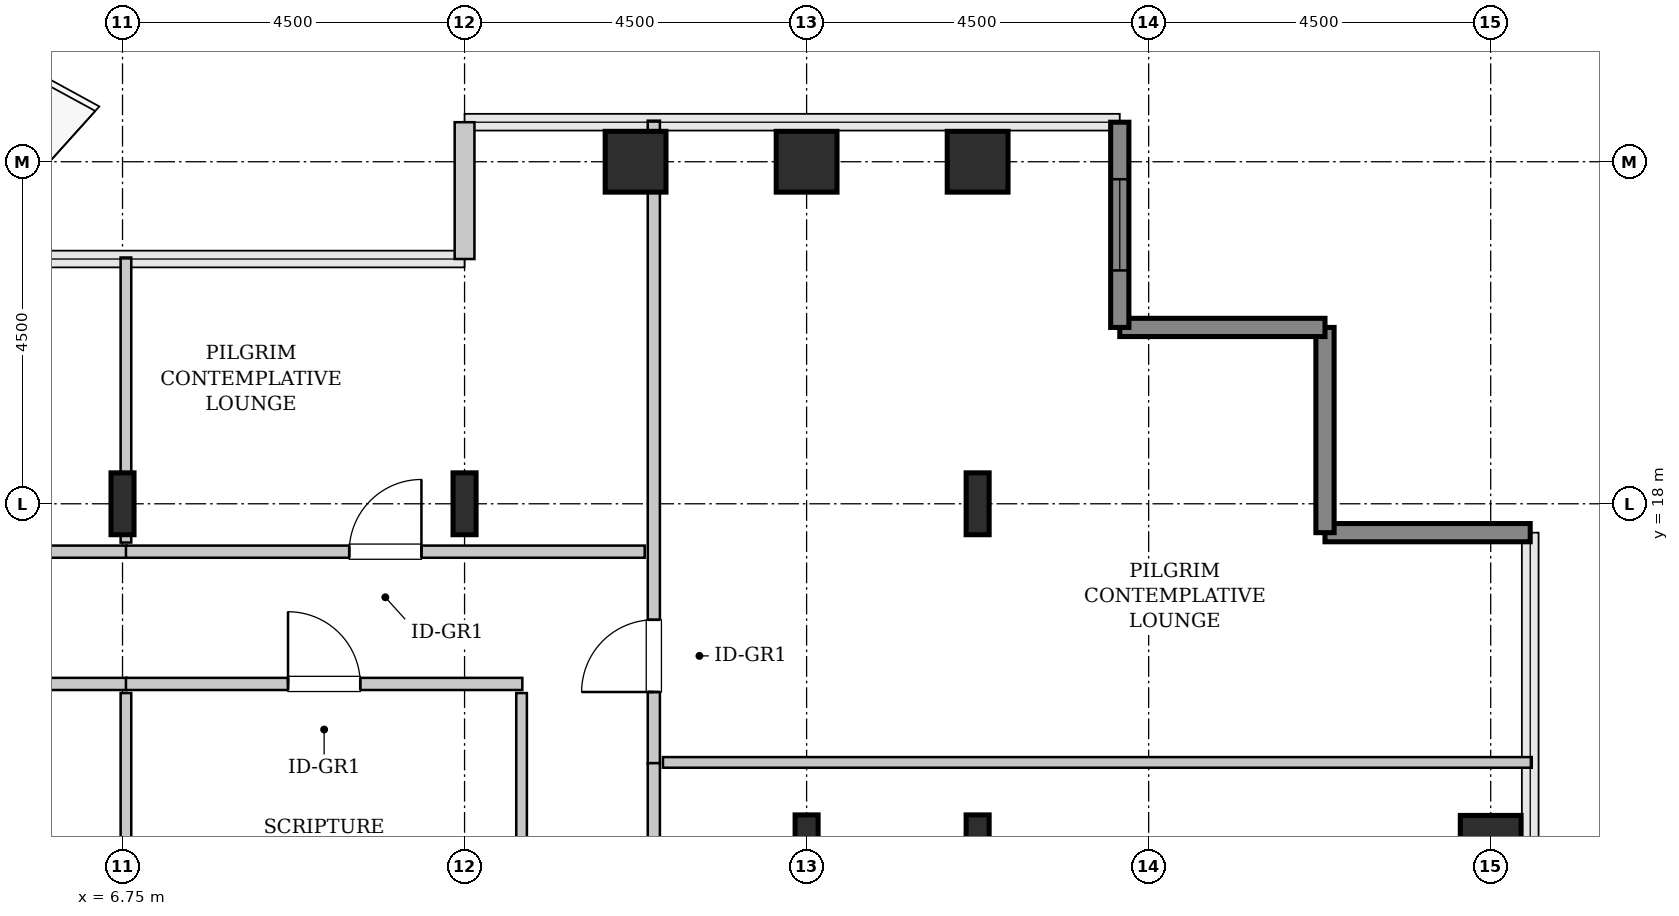
"""IFC4 building model, lengths in metres.
Left out: names, types, materials, properties, quantities, classifications, styles, units other than length and angle.
Written with IfcOpenShell. Run it as: python <this file> out.ifc"""

import sys

from ifc_helpers import new_model, si_unit, direction, frame, frame_2d, origin, origin_2d, place, context, subcontext, project, spatial, rectangle, hollow_rectangle, i_section, extrude, source, transform, mapped, element, fill, save


model = new_model("IFC4")
c1 = context("Model", 3, precision=1e-05, world=origin(), true_north=direction((0.0, 1.0)))
c2 = subcontext(c1, "Body", "Model", "MODEL_VIEW")
j1 = project(units=[si_unit("LENGTHUNIT", "METRE"), si_unit("PLANEANGLEUNIT", "RADIAN")], contexts=[c1])
p1 = place(None, origin())
s1 = spatial("IfcSite", under=j1, at=p1, CompositionType="ELEMENT")
p2 = place(p1, origin())
s2 = spatial("IfcBuilding", under=s1, at=p2, CompositionType="ELEMENT")
p3 = place(p2, frame((0.0, 0.0, 164.0)))
s3 = spatial("IfcBuildingStorey", under=s2, at=p3, CompositionType="ELEMENT", Elevation=164.0)
m1 = source(origin(), c2, "Body", "SweptSolid", [
    extrude(i_section(OverallWidth=0.303, OverallDepth=0.814, WebThickness=0.021, FlangeThickness=0.04, FilletRadius=0.03, at=origin_2d()), origin(), (0.0, 0.0, 1.0), 3.8),
])
for number, where, z_axis, x_axis in (
    (1, (6.75, 18.0, 0.0), (0.0, 0.0, 1.0), (1.0, 0.0, 0.0)),
    (2, (11.25, 18.0, 0.0), (0.0, 0.0, 1.0), (1.0, 0.0, 0.0)),
):
    element("IfcColumn", number, at=place(p3, frame(where, z_axis=z_axis, x_axis=x_axis)), inside=s3, PredefinedType="COLUMN", context=c2, shape_type="MappedRepresentation", body=[
        mapped(m1, transform((0.0, 0.0, 0.0), x_axis=(1.0, 0.0, 0.0), y_axis=(0.0, 1.0, 0.0), z_axis=(0.0, 0.0, 1.0), scale=1.0)),
    ])
m2 = source(origin(), c2, "Body", "SweptSolid", [
    extrude(hollow_rectangle(XDim=0.8, YDim=0.8, WallThickness=0.04, InnerFilletRadius=0.04, OuterFilletRadius=0.08, at=origin_2d()), origin(), (0.0, 0.0, 1.0), 3.8),
])
p4 = place(p3, frame((13.5, 22.5, 0.0), z_axis=(0.0, 0.0, 1.0), x_axis=(1.0, 0.0, 0.0)))
e3 = element("IfcColumn", 3, at=p4, inside=s3, PredefinedType="COLUMN", context=c2, shape_type="MappedRepresentation", body=[
    mapped(m2, transform((0.0, 0.0, 0.0), x_axis=(1.0, 0.0, 0.0), y_axis=(0.0, 1.0, 0.0), z_axis=(0.0, 0.0, 1.0), scale=1.0)),
])
p5 = place(p3, frame((15.75, 13.5, 0.0), z_axis=(0.0, 0.0, 1.0), x_axis=(1.0, 0.0, 0.0)))
e4 = element("IfcColumn", 4, at=p5, inside=s3, PredefinedType="COLUMN", context=c2, shape_type="MappedRepresentation", body=[
    mapped(m1, transform((0.0, 0.0, 0.0), x_axis=(1.0, 0.0, 0.0), y_axis=(0.0, 1.0, 0.0), z_axis=(0.0, 0.0, 1.0), scale=1.0)),
])
p6 = place(p3, frame((15.75, 22.5, 0.0), z_axis=(0.0, 0.0, 1.0), x_axis=(1.0, 0.0, 0.0)))
e5 = element("IfcColumn", 5, at=p6, inside=s3, PredefinedType="COLUMN", context=c2, shape_type="MappedRepresentation", body=[
    mapped(m2, transform((0.0, 0.0, 0.0), x_axis=(1.0, 0.0, 0.0), y_axis=(0.0, 1.0, 0.0), z_axis=(0.0, 0.0, 1.0), scale=1.0)),
])
for number, where, z_axis, x_axis in (
    (6, (18.0, 13.5, 0.0), (0.0, 0.0, 1.0), (1.0, 0.0, 0.0)),
    (7, (18.0, 18.0, 0.0), (0.0, 0.0, 1.0), (1.0, 0.0, 0.0)),
):
    element("IfcColumn", number, at=place(p3, frame(where, z_axis=z_axis, x_axis=x_axis)), inside=s3, PredefinedType="COLUMN", context=c2, shape_type="MappedRepresentation", body=[
        mapped(m1, transform((0.0, 0.0, 0.0), x_axis=(1.0, 0.0, 0.0), y_axis=(0.0, 1.0, 0.0), z_axis=(0.0, 0.0, 1.0), scale=1.0)),
    ])
for number, where, z_axis, x_axis in (
    (8, (18.0, 22.5, 0.0), (0.0, 0.0, 1.0), (1.0, 0.0, 0.0)),
    (9, (24.75, 13.5, 0.0), (0.0, 0.0, 1.0), (1.0, 0.0, 0.0)),
):
    element("IfcColumn", number, at=place(p3, frame(where, z_axis=z_axis, x_axis=x_axis)), inside=s3, PredefinedType="COLUMN", context=c2, shape_type="MappedRepresentation", body=[
        mapped(m2, transform((0.0, 0.0, 0.0), x_axis=(1.0, 0.0, 0.0), y_axis=(0.0, 1.0, 0.0), z_axis=(0.0, 0.0, 1.0), scale=1.0)),
    ])
m3 = source(origin(), c2, "Body", "SweptSolid", [
    extrude(rectangle(XDim=2.7, YDim=0.24, at=frame_2d((1.35, 0.0))), origin(), (0.0, 0.0, 1.0), 3.55),
])
for number, where, z_axis, x_axis in (
    (10, (25.27, 17.62, 0.0), (0.0, 0.0, 1.0), (-1.0, 0.0, 0.0)),
    (11, (22.57, 17.62, 0.0), (0.0, 0.0, 1.0), (0.0, 1.0, 0.0)),
    (12, (22.57, 20.32, 0.0), (0.0, 0.0, 1.0), (-1.0, 0.0, 0.0)),
):
    element("IfcWall", number, at=place(p3, frame(where, z_axis=z_axis, x_axis=x_axis)), inside=s3, PredefinedType="SHEAR", context=c2, shape_type="MappedRepresentation", body=[
        mapped(m3, transform((0.0, 0.0, 0.0), x_axis=(1.0, 0.0, 0.0), y_axis=(0.0, 1.0, 0.0), z_axis=(0.0, 0.0, 1.0), scale=1.0)),
    ])
p7 = place(p3, frame((19.87, 20.32, 0.0), z_axis=(0.0, 0.0, 1.0), x_axis=(0.0, 1.0, 0.0)))
e13 = element("IfcWall", 13, at=p7, inside=s3, PredefinedType="SHEAR", context=c2, shape_type="MappedRepresentation", body=[
    mapped(m3, transform((0.0, 0.0, 0.0), x_axis=(1.0, 0.0, 0.0), y_axis=(0.0, 1.0, 0.0), z_axis=(0.0, 0.0, 1.0), scale=1.0)),
])
p8 = place(p7, frame((0.75, 0.0, 0.85)))
e14 = element("IfcOpeningElement", 14, at=p8, cuts=e13, PredefinedType="OPENING", context=c2, shape_type="SweptSolid", body=[
    extrude(rectangle(XDim=1.2, YDim=1.8, at=frame_2d((0.6, 0.9))), frame((0.0, 0.13, 0.0), z_axis=(0.0, -1.0, 0.0), x_axis=(1.0, 0.0, 0.0)), (0.0, 0.0, 1.0), 0.26),
])
m4 = source(origin(), c2, "Body", "SweptSolid", [
    extrude(rectangle(XDim=1.8, YDim=0.26, at=frame_2d((0.9, 0.0))), origin(), (0.0, 0.0, 1.0), 3.55),
])
p9 = place(p3, frame((11.25, 23.02, 0.0), z_axis=(0.0, 0.0, 1.0), x_axis=(0.0, -1.0, 0.0)))
e15 = element("IfcWall", 15, at=p9, inside=s3, PredefinedType="SOLIDWALL", context=c2, shape_type="MappedRepresentation", body=[
    mapped(m4, transform((0.0, 0.0, 0.0), x_axis=(1.0, 0.0, 0.0), y_axis=(0.0, 1.0, 0.0), z_axis=(0.0, 0.0, 1.0), scale=1.0)),
])
m5 = source(origin(), c2, "Body", "SweptSolid", [
    extrude(rectangle(XDim=8.453, YDim=0.16, at=frame_2d((4.226, 0.0))), origin(), (0.0, 0.0, 1.0), 3.535),
])
p10 = place(p3, frame((13.74, 14.587, 0.0), z_axis=(0.0, 0.0, 1.0), x_axis=(0.0, 1.0, 0.0)))
e16 = element("IfcWall", 16, at=p10, inside=s3, PredefinedType="PARTITIONING", context=c2, shape_type="MappedRepresentation", body=[
    mapped(m5, transform((0.0, 0.0, 0.0), x_axis=(1.0, 0.0, 0.0), y_axis=(0.0, 1.0, 0.0), z_axis=(0.0, 0.0, 1.0), scale=1.0)),
])
p11 = place(p10, frame((0.936, 0.0, 0.0)))
e17 = element("IfcOpeningElement", 17, at=p11, cuts=e16, PredefinedType="OPENING", context=c2, shape_type="SweptSolid", body=[
    extrude(rectangle(XDim=0.95, YDim=2.1, at=frame_2d((0.475, 1.05))), frame((0.0, 0.09, 0.0), z_axis=(0.0, -1.0, 0.0), x_axis=(1.0, 0.0, 0.0)), (0.0, 0.0, 1.0), 0.18),
])
m6 = source(origin(), c2, "Body", "SweptSolid", [
    extrude(rectangle(XDim=11.43, YDim=0.14, at=frame_2d((5.715, 0.0))), origin(), (0.0, 0.0, 1.0), 3.535),
])
p12 = place(p3, frame((13.86, 14.597, 0.0), z_axis=(0.0, 0.0, 1.0), x_axis=(1.0, 0.0, 0.0)))
e18 = element("IfcWall", 18, at=p12, inside=s3, PredefinedType="PARTITIONING", context=c2, shape_type="MappedRepresentation", body=[
    mapped(m6, transform((0.0, 0.0, 0.0), x_axis=(1.0, 0.0, 0.0), y_axis=(0.0, 1.0, 0.0), z_axis=(0.0, 0.0, 1.0), scale=1.0)),
])
m7 = source(origin(), c2, "Body", "SweptSolid", [
    extrude(rectangle(XDim=8.392, YDim=0.16, at=frame_2d((4.196, 0.0))), origin(), (0.0, 0.0, 1.0), 3.535),
])
p13 = place(p3, frame((13.74, 6.195, 0.0), z_axis=(0.0, 0.0, 1.0), x_axis=(0.0, 1.0, 0.0)))
e19 = element("IfcWall", 19, at=p13, inside=s3, PredefinedType="PARTITIONING", context=c2, shape_type="MappedRepresentation", body=[
    mapped(m7, transform((0.0, 0.0, 0.0), x_axis=(1.0, 0.0, 0.0), y_axis=(0.0, 1.0, 0.0), z_axis=(0.0, 0.0, 1.0), scale=1.0)),
])
p14 = place(p13, frame((3.721, 0.0, 0.0)))
e20 = element("IfcOpeningElement", 20, at=p14, cuts=e19, PredefinedType="OPENING", context=c2, shape_type="SweptSolid", body=[
    extrude(rectangle(XDim=0.95, YDim=2.1, at=frame_2d((0.475, 1.05))), frame((0.0, 0.09, 0.0), z_axis=(0.0, -1.0, 0.0), x_axis=(1.0, 0.0, 0.0)), (0.0, 0.0, 1.0), 0.18),
])
m8 = source(origin(), c2, "Body", "SweptSolid", [
    extrude(rectangle(XDim=11.61, YDim=0.16, at=frame_2d((5.805, 0.0))), origin(), (0.0, 0.0, 1.0), 3.535),
])
p15 = place(p3, frame((-4.805, 17.37, 0.0), z_axis=(0.0, 0.0, 1.0), x_axis=(1.0, 0.0, 0.0)))
e21 = element("IfcWall", 21, at=p15, inside=s3, PredefinedType="PARTITIONING", context=c2, shape_type="MappedRepresentation", body=[
    mapped(m8, transform((0.0, 0.0, 0.0), x_axis=(1.0, 0.0, 0.0), y_axis=(0.0, 1.0, 0.0), z_axis=(0.0, 0.0, 1.0), scale=1.0)),
])
p16 = place(p15, frame((5.33, 0.0, 0.0)))
e22 = element("IfcOpeningElement", 22, at=p16, cuts=e21, PredefinedType="OPENING", context=c2, shape_type="SweptSolid", body=[
    extrude(rectangle(XDim=0.95, YDim=2.1, at=frame_2d((0.475, 1.05))), frame((0.0, 0.09, 0.0), z_axis=(0.0, -1.0, 0.0), x_axis=(1.0, 0.0, 0.0)), (0.0, 0.0, 1.0), 0.18),
])
m9 = source(origin(), c2, "Body", "SweptSolid", [
    extrude(rectangle(XDim=3.75, YDim=0.14, at=frame_2d((1.875, 0.0))), origin(), (0.0, 0.0, 1.0), 3.535),
])
p17 = place(p3, frame((6.795, 17.49, 0.0), z_axis=(0.0, 0.0, 1.0), x_axis=(0.0, 1.0, 0.0)))
e23 = element("IfcWall", 23, at=p17, inside=s3, PredefinedType="PARTITIONING", context=c2, shape_type="MappedRepresentation", body=[
    mapped(m9, transform((0.0, 0.0, 0.0), x_axis=(1.0, 0.0, 0.0), y_axis=(0.0, 1.0, 0.0), z_axis=(0.0, 0.0, 1.0), scale=1.0)),
])
p18 = place(p3, frame((-4.805, 15.63, 0.0), z_axis=(0.0, 0.0, 1.0), x_axis=(1.0, 0.0, 0.0)))
e24 = element("IfcWall", 24, at=p18, inside=s3, PredefinedType="PARTITIONING", context=c2, shape_type="MappedRepresentation", body=[
    mapped(m8, transform((0.0, 0.0, 0.0), x_axis=(1.0, 0.0, 0.0), y_axis=(0.0, 1.0, 0.0), z_axis=(0.0, 0.0, 1.0), scale=1.0)),
])
p19 = place(p18, frame((5.33, 0.0, 0.0)))
e25 = element("IfcOpeningElement", 25, at=p19, cuts=e24, PredefinedType="OPENING", context=c2, shape_type="SweptSolid", body=[
    extrude(rectangle(XDim=0.95, YDim=2.1, at=frame_2d((0.475, 1.05))), frame((0.0, 0.09, 0.0), z_axis=(0.0, -1.0, 0.0), x_axis=(1.0, 0.0, 0.0)), (0.0, 0.0, 1.0), 0.18),
])
m10 = source(origin(), c2, "Body", "SweptSolid", [
    extrude(rectangle(XDim=3.93, YDim=0.14, at=frame_2d((1.965, 0.0))), origin(), (0.0, 0.0, 1.0), 3.535),
])
p20 = place(p3, frame((6.795, 11.58, 0.0), z_axis=(0.0, 0.0, 1.0), x_axis=(0.0, 1.0, 0.0)))
e26 = element("IfcWall", 26, at=p20, inside=s3, PredefinedType="PARTITIONING", context=c2, shape_type="MappedRepresentation", body=[
    mapped(m10, transform((0.0, 0.0, 0.0), x_axis=(1.0, 0.0, 0.0), y_axis=(0.0, 1.0, 0.0), z_axis=(0.0, 0.0, 1.0), scale=1.0)),
])
m11 = source(origin(), c2, "Body", "SweptSolid", [
    extrude(rectangle(XDim=6.825, YDim=0.16, at=frame_2d((3.413, 0.0))), origin(), (0.0, 0.0, 1.0), 3.535),
])
p21 = place(p3, frame((6.795, 17.37, 0.0), z_axis=(0.0, 0.0, 1.0), x_axis=(1.0, 0.0, 0.0)))
e27 = element("IfcWall", 27, at=p21, inside=s3, PredefinedType="PARTITIONING", context=c2, shape_type="MappedRepresentation", body=[
    mapped(m11, transform((0.0, 0.0, 0.0), x_axis=(1.0, 0.0, 0.0), y_axis=(0.0, 1.0, 0.0), z_axis=(0.0, 0.0, 1.0), scale=1.0)),
])
p22 = place(p21, frame((2.938, 0.0, 0.0)))
e28 = element("IfcOpeningElement", 28, at=p22, cuts=e27, PredefinedType="OPENING", context=c2, shape_type="SweptSolid", body=[
    extrude(rectangle(XDim=0.95, YDim=2.1, at=frame_2d((0.475, 1.05))), frame((0.0, 0.09, 0.0), z_axis=(0.0, -1.0, 0.0), x_axis=(1.0, 0.0, 0.0)), (0.0, 0.0, 1.0), 0.18),
])
m12 = source(origin(), c2, "Body", "SweptSolid", [
    extrude(rectangle(XDim=5.215, YDim=0.16, at=frame_2d((2.607, 0.0))), origin(), (0.0, 0.0, 1.0), 3.535),
])
p23 = place(p3, frame((6.795, 15.63, 0.0), z_axis=(0.0, 0.0, 1.0), x_axis=(1.0, 0.0, 0.0)))
e29 = element("IfcWall", 29, at=p23, inside=s3, PredefinedType="PARTITIONING", context=c2, shape_type="MappedRepresentation", body=[
    mapped(m12, transform((0.0, 0.0, 0.0), x_axis=(1.0, 0.0, 0.0), y_axis=(0.0, 1.0, 0.0), z_axis=(0.0, 0.0, 1.0), scale=1.0)),
])
p24 = place(p23, frame((2.133, 0.0, 0.0)))
e30 = element("IfcOpeningElement", 30, at=p24, cuts=e29, PredefinedType="OPENING", context=c2, shape_type="SweptSolid", body=[
    extrude(rectangle(XDim=0.95, YDim=2.1, at=frame_2d((0.475, 1.05))), frame((0.0, 0.09, 0.0), z_axis=(0.0, -1.0, 0.0), x_axis=(1.0, 0.0, 0.0)), (0.0, 0.0, 1.0), 0.18),
])
p25 = place(p3, frame((12.0, 11.58, 0.0), z_axis=(0.0, 0.0, 1.0), x_axis=(0.0, 1.0, 0.0)))
e31 = element("IfcWall", 31, at=p25, inside=s3, PredefinedType="PARTITIONING", context=c2, shape_type="MappedRepresentation", body=[
    mapped(m10, transform((0.0, 0.0, 0.0), x_axis=(1.0, 0.0, 0.0), y_axis=(0.0, 1.0, 0.0), z_axis=(0.0, 0.0, 1.0), scale=1.0)),
])
m13 = source(origin(), c2, "Body", "SweptSolid", [
    extrude(rectangle(XDim=1.2, YDim=1.8, at=frame_2d((0.6, 0.9))), frame((0.0, 0.03, 0.0), z_axis=(0.0, -1.0, 0.0), x_axis=(1.0, 0.0, 0.0)), (0.0, 0.0, 1.0), 0.06),
])
p26 = place(p8, origin())
e32 = element("IfcWindow", 32, at=p26, inside=s3, PartitioningType="SINGLE_PANEL", PredefinedType="WINDOW", context=c2, shape_type="MappedRepresentation", body=[
    mapped(m13, transform((0.0, 0.0, 0.0), x_axis=(1.0, 0.0, 0.0), y_axis=(0.0, 1.0, 0.0), z_axis=(0.0, 0.0, 1.0), scale=1.0)),
])
fill(e14, e32)
m14 = source(origin(), c2, "Body", "SweptSolid", [
    extrude(rectangle(XDim=0.95, YDim=2.1, at=frame_2d((0.475, 1.05))), frame((0.0, 0.025, 0.0), z_axis=(0.0, -1.0, 0.0), x_axis=(1.0, 0.0, 0.0)), (0.0, 0.0, 1.0), 0.05),
])
p27 = place(p11, origin())
e33 = element("IfcDoor", 33, at=p27, inside=s3, OperationType="SINGLE_SWING_LEFT", PredefinedType="DOOR", context=c2, shape_type="MappedRepresentation", body=[
    mapped(m14, transform((0.0, 0.0, 0.0), x_axis=(1.0, 0.0, 0.0), y_axis=(0.0, 1.0, 0.0), z_axis=(0.0, 0.0, 1.0), scale=1.0)),
])
fill(e17, e33)
p28 = place(p22, origin())
e34 = element("IfcDoor", 34, at=p28, inside=s3, OperationType="SINGLE_SWING_RIGHT", PredefinedType="DOOR", context=c2, shape_type="MappedRepresentation", body=[
    mapped(m14, transform((0.0, 0.0, 0.0), x_axis=(1.0, 0.0, 0.0), y_axis=(0.0, 1.0, 0.0), z_axis=(0.0, 0.0, 1.0), scale=1.0)),
])
fill(e28, e34)
p29 = place(p24, origin())
e35 = element("IfcDoor", 35, at=p29, inside=s3, OperationType="SINGLE_SWING_LEFT", PredefinedType="DOOR", context=c2, shape_type="MappedRepresentation", body=[
    mapped(m14, transform((0.0, 0.0, 0.0), x_axis=(1.0, 0.0, 0.0), y_axis=(0.0, 1.0, 0.0), z_axis=(0.0, 0.0, 1.0), scale=1.0)),
])
fill(e30, e35)
save(model, sys.argv[1])
